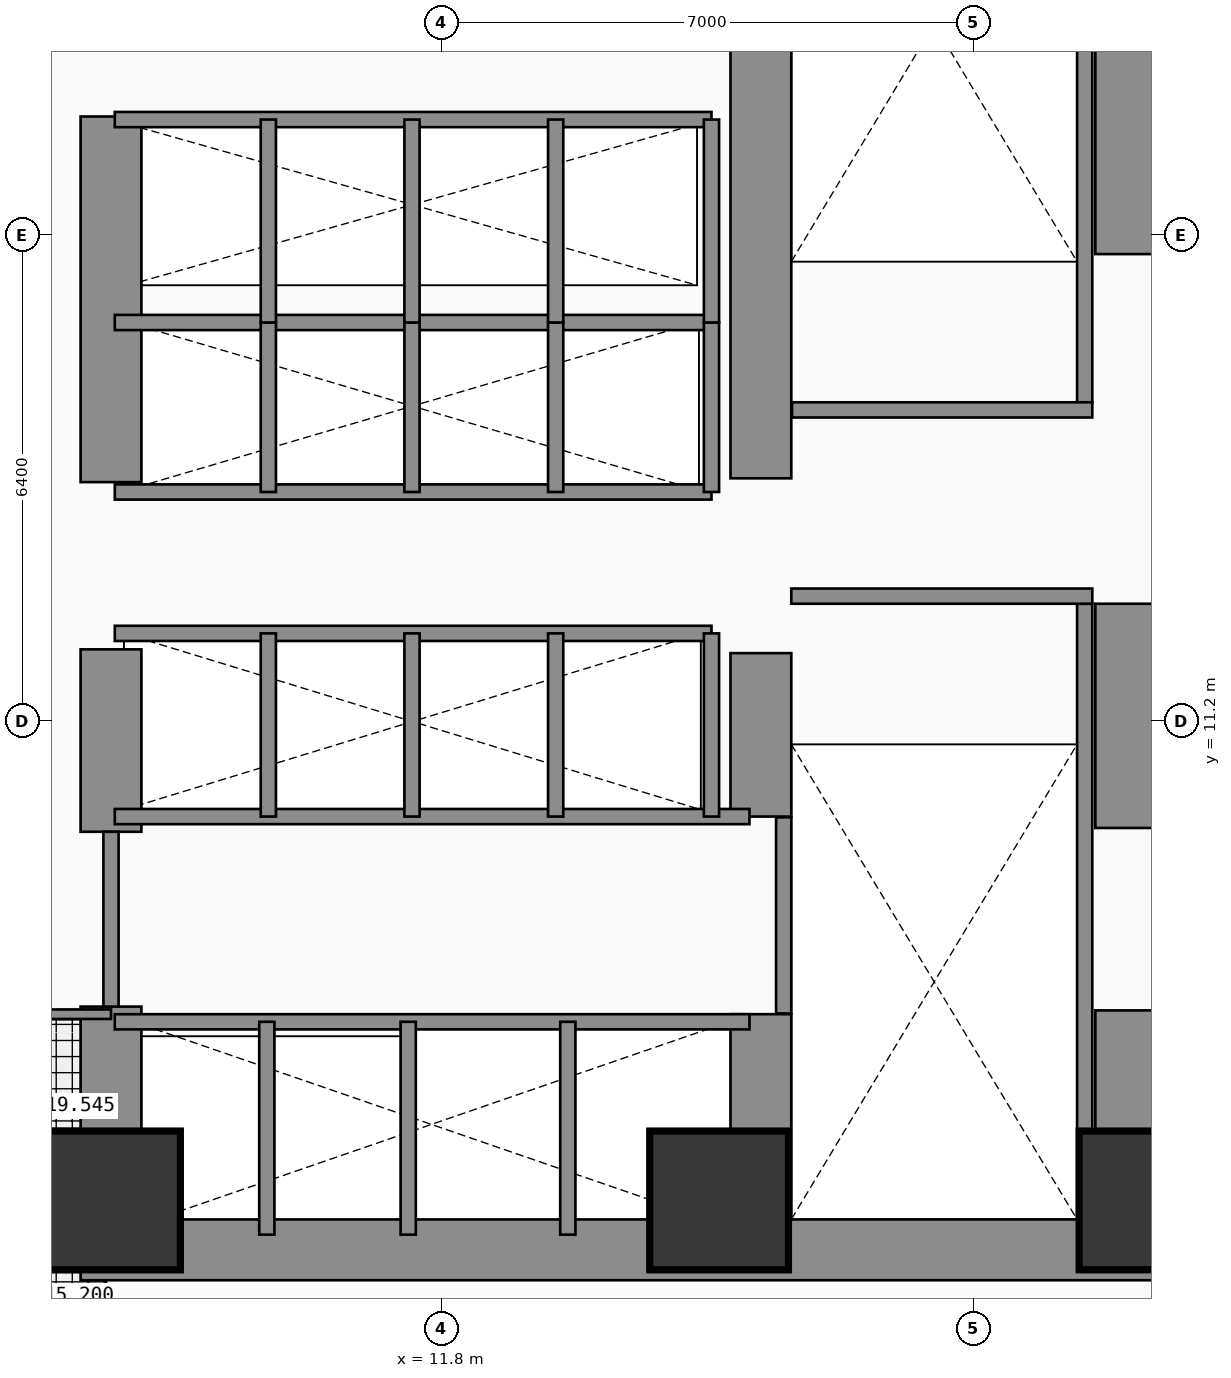
"""IFC4 building model, lengths in metres.
Left out: names, types, materials, properties, quantities, classifications, styles, units other than length and angle.
Written with IfcOpenShell. Run it as: python <this file> out.ifc"""

import sys

from ifc_helpers import new_model, si_unit, direction, frame, frame_2d, origin, origin_2d, place, context, subcontext, project, spatial, rectangle, extrude, element, fill, save


model = new_model("IFC4")
c1 = context("Model", 3, precision=1e-05, world=origin(), true_north=direction((0.0, 1.0)))
c2 = subcontext(c1, "Body", "Model", "MODEL_VIEW")
j1 = project(units=[si_unit("LENGTHUNIT", "METRE"), si_unit("PLANEANGLEUNIT", "RADIAN")], contexts=[c1])
p1 = place(None, origin())
s1 = spatial("IfcSite", under=j1, at=p1, CompositionType="ELEMENT")
p2 = place(p1, origin())
s2 = spatial("IfcBuilding", under=s1, at=p2, CompositionType="ELEMENT")
p3 = place(p2, frame((0.0, 0.0, 15.2)))
s3 = spatial("IfcBuildingStorey", under=s2, at=p3, CompositionType="ELEMENT", Elevation=15.2)
p4 = place(p3, frame((7.05, 4.25, 0.0), z_axis=(0.0, 0.0, 1.0), x_axis=(1.0, 0.0, 0.0)))
e1 = element("IfcWall", 1, at=p4, inside=s3, PredefinedType="SHEAR", context=c2, shape_type="SweptSolid", body=[
    extrude(rectangle(XDim=14.15, YDim=0.8, at=frame_2d((7.075, 0.0))), origin(), (0.0, 0.0, 1.0), 4.46),
])
p5 = place(p3, frame((7.45, 4.65, 0.0), z_axis=(0.0, 0.0, 1.0), x_axis=(0.0, 1.0, 0.0)))
e2 = element("IfcWall", 2, at=p5, inside=s3, PredefinedType="SHEAR", context=c2, shape_type="SweptSolid", body=[
    extrude(rectangle(XDim=2.8, YDim=0.8, at=frame_2d((1.4, 0.0))), origin(), (0.0, 0.0, 1.0), 4.46),
])
p6 = place(p3, frame((7.45, 9.75, 0.0), z_axis=(0.0, 0.0, 1.0), x_axis=(0.0, 1.0, 0.0)))
e3 = element("IfcWall", 3, at=p6, inside=s3, PredefinedType="SHEAR", context=c2, shape_type="SweptSolid", body=[
    extrude(rectangle(XDim=2.4, YDim=0.8, at=frame_2d((1.2, 0.0))), origin(), (0.0, 0.0, 1.0), 4.46),
])
p7 = place(p3, frame((7.45, 14.35, 0.0), z_axis=(0.0, 0.0, 1.0), x_axis=(0.0, 1.0, 0.0)))
e4 = element("IfcWall", 4, at=p7, inside=s3, PredefinedType="SHEAR", context=c2, shape_type="SweptSolid", body=[
    extrude(rectangle(XDim=4.81, YDim=0.8, at=frame_2d((2.405, 0.0))), origin(), (0.0, 0.0, 1.0), 4.46),
])
p8 = place(p3, frame((20.8, 4.65, 0.0), z_axis=(0.0, 0.0, 1.0), x_axis=(0.0, 1.0, 0.0)))
e5 = element("IfcWall", 5, at=p8, inside=s3, PredefinedType="SHEAR", context=c2, shape_type="SweptSolid", body=[
    extrude(rectangle(XDim=2.75, YDim=0.8, at=frame_2d((1.375, 0.0))), origin(), (0.0, 0.0, 1.0), 4.46),
])
p9 = place(p3, frame((20.8, 9.8, 0.0), z_axis=(0.0, 0.0, 1.0), x_axis=(0.0, 1.0, 0.0)))
e6 = element("IfcWall", 6, at=p9, inside=s3, PredefinedType="SHEAR", context=c2, shape_type="SweptSolid", body=[
    extrude(rectangle(XDim=2.95, YDim=0.8, at=frame_2d((1.475, 0.0))), origin(), (0.0, 0.0, 1.0), 4.46),
])
p10 = place(p3, frame((20.8, 17.35, 0.0), z_axis=(0.0, 0.0, 1.0), x_axis=(0.0, 1.0, 0.0)))
e7 = element("IfcWall", 7, at=p10, inside=s3, PredefinedType="SHEAR", context=c2, shape_type="SweptSolid", body=[
    extrude(rectangle(XDim=6.15, YDim=0.8, at=frame_2d((3.075, 0.0))), origin(), (0.0, 0.0, 1.0), 4.46),
])
p11 = place(p3, frame((16.0, 4.65, 0.0), z_axis=(0.0, 0.0, 1.0), x_axis=(0.0, 1.0, 0.0)))
e8 = element("IfcWall", 8, at=p11, inside=s3, PredefinedType="SHEAR", context=c2, shape_type="SweptSolid", body=[
    extrude(rectangle(XDim=2.7, YDim=0.8, at=frame_2d((1.35, 0.0))), origin(), (0.0, 0.0, 1.0), 4.46),
])
p12 = place(p3, frame((16.0, 9.95, 0.0), z_axis=(0.0, 0.0, 1.0), x_axis=(0.0, 1.0, 0.0)))
e9 = element("IfcWall", 9, at=p12, inside=s3, PredefinedType="SHEAR", context=c2, shape_type="SweptSolid", body=[
    extrude(rectangle(XDim=2.15, YDim=0.8, at=frame_2d((1.075, 0.0))), origin(), (0.0, 0.0, 1.0), 4.46),
])
p13 = place(p3, frame((16.0, 14.4, 0.0), z_axis=(0.0, 0.0, 1.0), x_axis=(0.0, 1.0, 0.0)))
e10 = element("IfcWall", 10, at=p13, inside=s3, PredefinedType="SHEAR", context=c2, shape_type="SweptSolid", body=[
    extrude(rectangle(XDim=9.1, YDim=0.8, at=frame_2d((4.55, 0.0))), origin(), (0.0, 0.0, 1.0), 4.46),
])
for number, where, z_axis, x_axis in (
    (11, (7.45, 4.9, 0.0), (0.0, 0.0, 1.0), (1.0, 0.0, 0.0)),
    (12, (15.45, 4.9, 0.0), (0.0, 0.0, 1.0), (1.0, 0.0, 0.0)),
    (13, (21.1, 4.9, 0.0), (0.0, 0.0, 1.0), (1.0, 0.0, 0.0)),
):
    element("IfcColumn", number, at=place(p3, frame(where, z_axis=z_axis, x_axis=x_axis)), inside=s3, PredefinedType="COLUMN", context=c2, shape_type="SweptSolid", body=[
        extrude(rectangle(XDim=1.8, YDim=1.8, at=origin_2d()), origin(), (0.0, 0.0, 1.0), 4.46),
    ])
p14 = place(p3, frame((16.3, 7.36, 0.0), z_axis=(0.0, 0.0, 1.0), x_axis=(0.0, 1.0, 0.0)))
e14 = element("IfcWall", 14, at=p14, inside=s3, PredefinedType="SHEAR", context=c2, shape_type="SweptSolid", body=[
    extrude(rectangle(XDim=2.58, YDim=0.2, at=frame_2d((1.29, 0.0))), origin(), (0.0, 0.0, 1.0), 4.46),
])
p15 = place(p3, frame((20.26, 4.66, 0.0), z_axis=(0.0, 0.0, 1.0), x_axis=(0.0, 1.0, 0.0)))
e15 = element("IfcWall", 15, at=p15, inside=s3, PredefinedType="SHEAR", context=c2, shape_type="SweptSolid", body=[
    extrude(rectangle(XDim=8.09, YDim=0.2, at=frame_2d((4.045, 0.0))), origin(), (0.0, 0.0, 1.0), 4.46),
])
p16 = place(p3, frame((16.4, 12.85, 0.0), z_axis=(0.0, 0.0, 1.0), x_axis=(1.0, 0.0, 0.0)))
e16 = element("IfcWall", 16, at=p16, inside=s3, PredefinedType="PARTITIONING", context=c2, shape_type="SweptSolid", body=[
    extrude(rectangle(XDim=3.96, YDim=0.2, at=frame_2d((1.98, 0.0))), origin(), (0.0, 0.0, 1.0), 4.46),
])
p17 = place(p16, frame((1.304, 0.0, 0.0)))
e17 = element("IfcOpeningElement", 17, at=p17, cuts=e16, PredefinedType="OPENING", context=c2, shape_type="SweptSolid", body=[
    extrude(rectangle(XDim=1.1, YDim=2.2, at=frame_2d((0.55, 1.1))), frame((0.0, 0.11, 0.0), z_axis=(0.0, -1.0, 0.0), x_axis=(1.0, 0.0, 0.0)), (0.0, 0.0, 1.0), 0.22),
])
p18 = place(p3, frame((20.26, 15.4, 0.0), z_axis=(0.0, 0.0, 1.0), x_axis=(0.0, 1.0, 0.0)))
e18 = element("IfcWall", 18, at=p18, inside=s3, PredefinedType="SHEAR", context=c2, shape_type="SweptSolid", body=[
    extrude(rectangle(XDim=8.09, YDim=0.2, at=frame_2d((4.045, 0.0))), origin(), (0.0, 0.0, 1.0), 4.46),
])
p19 = place(p3, frame((16.41, 15.3, 0.0), z_axis=(0.0, 0.0, 1.0), x_axis=(1.0, 0.0, 0.0)))
e19 = element("IfcWall", 19, at=p19, inside=s3, PredefinedType="PARTITIONING", context=c2, shape_type="SweptSolid", body=[
    extrude(rectangle(XDim=3.95, YDim=0.2, at=frame_2d((1.975, 0.0))), origin(), (0.0, 0.0, 1.0), 4.46),
])
p20 = place(p19, frame((1.294, 0.0, 0.0)))
e20 = element("IfcOpeningElement", 20, at=p20, cuts=e19, PredefinedType="OPENING", context=c2, shape_type="SweptSolid", body=[
    extrude(rectangle(XDim=1.1, YDim=2.2, at=frame_2d((0.55, 1.1))), frame((0.0, 0.11, 0.0), z_axis=(0.0, -1.0, 0.0), x_axis=(1.0, 0.0, 0.0)), (0.0, 0.0, 1.0), 0.22),
])
p21 = place(p3, frame((7.5, 7.25, 0.0), z_axis=(0.0, 0.0, 1.0), x_axis=(1.0, 0.0, 0.0)))
e21 = element("IfcWall", 21, at=p21, inside=s3, PredefinedType="PARTITIONING", context=c2, shape_type="SweptSolid", body=[
    extrude(rectangle(XDim=8.35, YDim=0.2, at=frame_2d((4.175, 0.0))), origin(), (0.0, 0.0, 1.0), 4.46),
])
p22 = place(p21, frame((0.53, 0.0, 0.0)))
e22 = element("IfcOpeningElement", 22, at=p22, cuts=e21, PredefinedType="OPENING", context=c2, shape_type="SweptSolid", body=[
    extrude(rectangle(XDim=1.1, YDim=2.2, at=frame_2d((0.55, 1.1))), frame((0.0, 0.11, 0.0), z_axis=(0.0, -1.0, 0.0), x_axis=(1.0, 0.0, 0.0)), (0.0, 0.0, 1.0), 0.22),
])
p23 = place(p21, frame((2.37, 0.0, 0.0)))
e23 = element("IfcOpeningElement", 23, at=p23, cuts=e21, PredefinedType="OPENING", context=c2, shape_type="SweptSolid", body=[
    extrude(rectangle(XDim=1.1, YDim=2.2, at=frame_2d((0.55, 1.1))), frame((0.0, 0.11, 0.0), z_axis=(0.0, -1.0, 0.0), x_axis=(1.0, 0.0, 0.0)), (0.0, 0.0, 1.0), 0.22),
])
p24 = place(p21, frame((4.33, 0.0, 0.0)))
e24 = element("IfcOpeningElement", 24, at=p24, cuts=e21, PredefinedType="OPENING", context=c2, shape_type="SweptSolid", body=[
    extrude(rectangle(XDim=1.1, YDim=2.2, at=frame_2d((0.55, 1.1))), frame((0.0, 0.11, 0.0), z_axis=(0.0, -1.0, 0.0), x_axis=(1.0, 0.0, 0.0)), (0.0, 0.0, 1.0), 0.22),
])
p25 = place(p21, frame((6.5, 0.0, 0.0)))
e25 = element("IfcOpeningElement", 25, at=p25, cuts=e21, PredefinedType="OPENING", context=c2, shape_type="SweptSolid", body=[
    extrude(rectangle(XDim=1.1, YDim=2.2, at=frame_2d((0.55, 1.1))), frame((0.0, 0.11, 0.0), z_axis=(0.0, -1.0, 0.0), x_axis=(1.0, 0.0, 0.0)), (0.0, 0.0, 1.0), 0.22),
])
p26 = place(p3, frame((7.5, 9.95, 0.0), z_axis=(0.0, 0.0, 1.0), x_axis=(1.0, 0.0, 0.0)))
e26 = element("IfcWall", 26, at=p26, inside=s3, PredefinedType="PARTITIONING", context=c2, shape_type="SweptSolid", body=[
    extrude(rectangle(XDim=8.35, YDim=0.2, at=frame_2d((4.175, 0.0))), origin(), (0.0, 0.0, 1.0), 4.46),
])
for number, where, z_axis, x_axis in (
    (27, (9.5, 4.45, 0.0), (0.0, 0.0, 1.0), (0.0, 1.0, 0.0)),
    (28, (11.36, 4.45, 0.0), (0.0, 0.0, 1.0), (0.0, 1.0, 0.0)),
    (29, (13.46, 4.45, 0.0), (0.0, 0.0, 1.0), (0.0, 1.0, 0.0)),
):
    element("IfcWall", number, at=place(p3, frame(where, z_axis=z_axis, x_axis=x_axis)), inside=s3, PredefinedType="PARTITIONING", context=c2, shape_type="SweptSolid", body=[
        extrude(rectangle(XDim=2.8, YDim=0.2, at=frame_2d((1.4, 0.0))), origin(), (0.0, 0.0, 1.0), 4.46),
    ])
p27 = place(p3, frame((7.45, 7.45, 0.0), z_axis=(0.0, 0.0, 1.0), x_axis=(0.0, 1.0, 0.0)))
e30 = element("IfcWall", 30, at=p27, inside=s3, PredefinedType="PARTITIONING", context=c2, shape_type="SweptSolid", body=[
    extrude(rectangle(XDim=2.3, YDim=0.2, at=frame_2d((1.15, 0.0))), origin(), (0.0, 0.0, 1.0), 3.24),
])
p28 = place(p27, frame((0.633, 0.0, 0.0)))
e31 = element("IfcOpeningElement", 31, at=p28, cuts=e30, PredefinedType="OPENING", context=c2, shape_type="SweptSolid", body=[
    extrude(rectangle(XDim=1.2, YDim=2.25, at=frame_2d((0.6, 1.125))), frame((0.0, 0.11, 0.0), z_axis=(0.0, -1.0, 0.0), x_axis=(1.0, 0.0, 0.0)), (0.0, 0.0, 1.0), 0.22),
])
p29 = place(p3, frame((7.5, 12.36, 0.0), z_axis=(0.0, 0.0, 1.0), x_axis=(1.0, 0.0, 0.0)))
e32 = element("IfcWall", 32, at=p29, inside=s3, PredefinedType="PARTITIONING", context=c2, shape_type="SweptSolid", body=[
    extrude(rectangle(XDim=7.85, YDim=0.2, at=frame_2d((3.925, 0.0))), origin(), (0.0, 0.0, 1.0), 4.46),
])
p30 = place(p29, frame((0.53, 0.0, 0.0)))
e33 = element("IfcOpeningElement", 33, at=p30, cuts=e32, PredefinedType="OPENING", context=c2, shape_type="SweptSolid", body=[
    extrude(rectangle(XDim=1.1, YDim=2.2, at=frame_2d((0.55, 1.1))), frame((0.0, 0.11, 0.0), z_axis=(0.0, -1.0, 0.0), x_axis=(1.0, 0.0, 0.0)), (0.0, 0.0, 1.0), 0.22),
])
p31 = place(p29, frame((2.42, 0.0, 0.0)))
e34 = element("IfcOpeningElement", 34, at=p31, cuts=e32, PredefinedType="OPENING", context=c2, shape_type="SweptSolid", body=[
    extrude(rectangle(XDim=1.1, YDim=2.2, at=frame_2d((0.55, 1.1))), frame((0.0, 0.11, 0.0), z_axis=(0.0, -1.0, 0.0), x_axis=(1.0, 0.0, 0.0)), (0.0, 0.0, 1.0), 0.22),
])
p32 = place(p29, frame((4.31, 0.0, 0.0)))
e35 = element("IfcOpeningElement", 35, at=p32, cuts=e32, PredefinedType="OPENING", context=c2, shape_type="SweptSolid", body=[
    extrude(rectangle(XDim=1.1, YDim=2.2, at=frame_2d((0.55, 1.1))), frame((0.0, 0.11, 0.0), z_axis=(0.0, -1.0, 0.0), x_axis=(1.0, 0.0, 0.0)), (0.0, 0.0, 1.0), 0.22),
])
p33 = place(p29, frame((6.2, 0.0, 0.0)))
e36 = element("IfcOpeningElement", 36, at=p33, cuts=e32, PredefinedType="OPENING", context=c2, shape_type="SweptSolid", body=[
    extrude(rectangle(XDim=1.1, YDim=2.2, at=frame_2d((0.55, 1.1))), frame((0.0, 0.11, 0.0), z_axis=(0.0, -1.0, 0.0), x_axis=(1.0, 0.0, 0.0)), (0.0, 0.0, 1.0), 0.22),
])
for number, where, z_axis, x_axis in (
    (37, (15.35, 9.95, 0.0), (0.0, 0.0, 1.0), (0.0, 1.0, 0.0)),
    (38, (9.52, 9.95, 0.0), (0.0, 0.0, 1.0), (0.0, 1.0, 0.0)),
    (39, (11.41, 9.95, 0.0), (0.0, 0.0, 1.0), (0.0, 1.0, 0.0)),
    (40, (13.3, 9.95, 0.0), (0.0, 0.0, 1.0), (0.0, 1.0, 0.0)),
):
    element("IfcWall", number, at=place(p3, frame(where, z_axis=z_axis, x_axis=x_axis)), inside=s3, PredefinedType="PARTITIONING", context=c2, shape_type="SweptSolid", body=[
        extrude(rectangle(XDim=2.41, YDim=0.2, at=frame_2d((1.205, 0.0))), origin(), (0.0, 0.0, 1.0), 4.46),
    ])
for number, where, z_axis, x_axis in (
    (41, (7.5, 14.22, 0.0), (0.0, 0.0, 1.0), (1.0, 0.0, 0.0)),
    (42, (7.5, 16.45, 0.0), (0.0, 0.0, 1.0), (1.0, 0.0, 0.0)),
):
    element("IfcWall", number, at=place(p3, frame(where, z_axis=z_axis, x_axis=x_axis)), inside=s3, PredefinedType="PARTITIONING", context=c2, shape_type="SweptSolid", body=[
        extrude(rectangle(XDim=7.85, YDim=0.2, at=frame_2d((3.925, 0.0))), origin(), (0.0, 0.0, 1.0), 4.46),
    ])
for number, where, z_axis, x_axis in (
    (43, (15.35, 14.22, 0.0), (0.0, 0.0, 1.0), (0.0, 1.0, 0.0)),
    (44, (9.52, 14.22, 0.0), (0.0, 0.0, 1.0), (0.0, 1.0, 0.0)),
    (45, (11.41, 14.22, 0.0), (0.0, 0.0, 1.0), (0.0, 1.0, 0.0)),
    (46, (13.3, 14.22, 0.0), (0.0, 0.0, 1.0), (0.0, 1.0, 0.0)),
):
    element("IfcWall", number, at=place(p3, frame(where, z_axis=z_axis, x_axis=x_axis)), inside=s3, PredefinedType="PARTITIONING", context=c2, shape_type="SweptSolid", body=[
        extrude(rectangle(XDim=2.23, YDim=0.2, at=frame_2d((1.115, 0.0))), origin(), (0.0, 0.0, 1.0), 4.46),
    ])
p34 = place(p3, frame((7.5, 19.12, 0.0), z_axis=(0.0, 0.0, 1.0), x_axis=(1.0, 0.0, 0.0)))
e47 = element("IfcWall", 47, at=p34, inside=s3, PredefinedType="PARTITIONING", context=c2, shape_type="SweptSolid", body=[
    extrude(rectangle(XDim=7.85, YDim=0.2, at=frame_2d((3.925, 0.0))), origin(), (0.0, 0.0, 1.0), 4.46),
])
for number, where, z_axis, x_axis in (
    (48, (15.35, 16.45, 0.0), (0.0, 0.0, 1.0), (0.0, 1.0, 0.0)),
    (49, (9.52, 16.45, 0.0), (0.0, 0.0, 1.0), (0.0, 1.0, 0.0)),
    (50, (11.41, 16.45, 0.0), (0.0, 0.0, 1.0), (0.0, 1.0, 0.0)),
    (51, (13.3, 16.45, 0.0), (0.0, 0.0, 1.0), (0.0, 1.0, 0.0)),
):
    element("IfcWall", number, at=place(p3, frame(where, z_axis=z_axis, x_axis=x_axis)), inside=s3, PredefinedType="PARTITIONING", context=c2, shape_type="SweptSolid", body=[
        extrude(rectangle(XDim=2.67, YDim=0.2, at=frame_2d((1.335, 0.0))), origin(), (0.0, 0.0, 1.0), 4.46),
    ])
p35 = place(p3, frame((0.42, 7.35, 0.0), z_axis=(0.0, 0.0, 1.0), x_axis=(1.0, 0.0, 0.0)))
e52 = element("IfcWall", 52, at=p35, inside=s3, PredefinedType="PARTITIONING", context=c2, shape_type="SweptSolid", body=[
    extrude(rectangle(XDim=7.03, YDim=0.125, at=frame_2d((3.515, 0.0))), origin(), (0.0, 0.0, 1.0), 4.46),
])
p36 = place(p35, frame((4.78, 0.0, 0.0)))
e53 = element("IfcOpeningElement", 53, at=p36, cuts=e52, PredefinedType="OPENING", context=c2, shape_type="SweptSolid", body=[
    extrude(rectangle(XDim=0.95, YDim=2.15, at=frame_2d((0.475, 1.075))), frame((0.0, 0.073, 0.0), z_axis=(0.0, -1.0, 0.0), x_axis=(1.0, 0.0, 0.0)), (0.0, 0.0, 1.0), 0.145),
])
p37 = place(p17, frame((1.1, 0.0, 0.0), z_axis=(0.0, 0.0, 1.0), x_axis=(-1.0, 0.0, 0.0)))
e54 = element("IfcDoor", 54, at=p37, inside=s3, OperationType="SINGLE_SWING_RIGHT", PredefinedType="DOOR", context=c2, shape_type="SweptSolid", body=[
    extrude(rectangle(XDim=1.1, YDim=2.2, at=frame_2d((0.55, 1.1))), frame((0.0, 0.025, 0.0), z_axis=(0.0, -1.0, 0.0), x_axis=(1.0, 0.0, 0.0)), (0.0, 0.0, 1.0), 0.05),
])
fill(e17, e54)
p38 = place(p20, origin())
e55 = element("IfcDoor", 55, at=p38, inside=s3, OperationType="SINGLE_SWING_LEFT", PredefinedType="DOOR", context=c2, shape_type="SweptSolid", body=[
    extrude(rectangle(XDim=1.1, YDim=2.2, at=frame_2d((0.55, 1.1))), frame((0.0, 0.025, 0.0), z_axis=(0.0, -1.0, 0.0), x_axis=(1.0, 0.0, 0.0)), (0.0, 0.0, 1.0), 0.05),
])
fill(e20, e55)
p39 = place(p22, origin())
e56 = element("IfcDoor", 56, at=p39, inside=s3, OperationType="SLIDING_TO_LEFT", PredefinedType="DOOR", context=c2, shape_type="SweptSolid", body=[
    extrude(rectangle(XDim=1.1, YDim=2.2, at=frame_2d((0.55, 1.1))), frame((0.0, 0.025, 0.0), z_axis=(0.0, -1.0, 0.0), x_axis=(1.0, 0.0, 0.0)), (0.0, 0.0, 1.0), 0.05),
])
fill(e22, e56)
p40 = place(p23, origin())
e57 = element("IfcDoor", 57, at=p40, inside=s3, OperationType="SLIDING_TO_LEFT", PredefinedType="DOOR", context=c2, shape_type="SweptSolid", body=[
    extrude(rectangle(XDim=1.1, YDim=2.2, at=frame_2d((0.55, 1.1))), frame((0.0, 0.025, 0.0), z_axis=(0.0, -1.0, 0.0), x_axis=(1.0, 0.0, 0.0)), (0.0, 0.0, 1.0), 0.05),
])
fill(e23, e57)
p41 = place(p24, origin())
e58 = element("IfcDoor", 58, at=p41, inside=s3, OperationType="SLIDING_TO_LEFT", PredefinedType="DOOR", context=c2, shape_type="SweptSolid", body=[
    extrude(rectangle(XDim=1.1, YDim=2.2, at=frame_2d((0.55, 1.1))), frame((0.0, 0.025, 0.0), z_axis=(0.0, -1.0, 0.0), x_axis=(1.0, 0.0, 0.0)), (0.0, 0.0, 1.0), 0.05),
])
fill(e24, e58)
p42 = place(p25, origin())
e59 = element("IfcDoor", 59, at=p42, inside=s3, OperationType="SLIDING_TO_LEFT", PredefinedType="DOOR", context=c2, shape_type="SweptSolid", body=[
    extrude(rectangle(XDim=1.1, YDim=2.2, at=frame_2d((0.55, 1.1))), frame((0.0, 0.025, 0.0), z_axis=(0.0, -1.0, 0.0), x_axis=(1.0, 0.0, 0.0)), (0.0, 0.0, 1.0), 0.05),
])
fill(e25, e59)
p43 = place(p28, frame((1.2, 0.0, 0.0), z_axis=(0.0, 0.0, 1.0), x_axis=(-1.0, 0.0, 0.0)))
e60 = element("IfcDoor", 60, at=p43, inside=s3, OperationType="SINGLE_SWING_LEFT", PredefinedType="DOOR", context=c2, shape_type="SweptSolid", body=[
    extrude(rectangle(XDim=1.2, YDim=2.25, at=frame_2d((0.6, 1.125))), frame((0.0, 0.025, 0.0), z_axis=(0.0, -1.0, 0.0), x_axis=(1.0, 0.0, 0.0)), (0.0, 0.0, 1.0), 0.05),
])
fill(e31, e60)
p44 = place(p30, origin())
e61 = element("IfcDoor", 61, at=p44, inside=s3, OperationType="SLIDING_TO_LEFT", PredefinedType="DOOR", context=c2, shape_type="SweptSolid", body=[
    extrude(rectangle(XDim=1.1, YDim=2.2, at=frame_2d((0.55, 1.1))), frame((0.0, 0.025, 0.0), z_axis=(0.0, -1.0, 0.0), x_axis=(1.0, 0.0, 0.0)), (0.0, 0.0, 1.0), 0.05),
])
fill(e33, e61)
p45 = place(p31, origin())
e62 = element("IfcDoor", 62, at=p45, inside=s3, OperationType="SLIDING_TO_LEFT", PredefinedType="DOOR", context=c2, shape_type="SweptSolid", body=[
    extrude(rectangle(XDim=1.1, YDim=2.2, at=frame_2d((0.55, 1.1))), frame((0.0, 0.025, 0.0), z_axis=(0.0, -1.0, 0.0), x_axis=(1.0, 0.0, 0.0)), (0.0, 0.0, 1.0), 0.05),
])
fill(e34, e62)
p46 = place(p32, origin())
e63 = element("IfcDoor", 63, at=p46, inside=s3, OperationType="SLIDING_TO_LEFT", PredefinedType="DOOR", context=c2, shape_type="SweptSolid", body=[
    extrude(rectangle(XDim=1.1, YDim=2.2, at=frame_2d((0.55, 1.1))), frame((0.0, 0.025, 0.0), z_axis=(0.0, -1.0, 0.0), x_axis=(1.0, 0.0, 0.0)), (0.0, 0.0, 1.0), 0.05),
])
fill(e35, e63)
p47 = place(p33, origin())
e64 = element("IfcDoor", 64, at=p47, inside=s3, OperationType="SLIDING_TO_LEFT", PredefinedType="DOOR", context=c2, shape_type="SweptSolid", body=[
    extrude(rectangle(XDim=1.1, YDim=2.2, at=frame_2d((0.55, 1.1))), frame((0.0, 0.025, 0.0), z_axis=(0.0, -1.0, 0.0), x_axis=(1.0, 0.0, 0.0)), (0.0, 0.0, 1.0), 0.05),
])
fill(e36, e64)
save(model, sys.argv[1])
